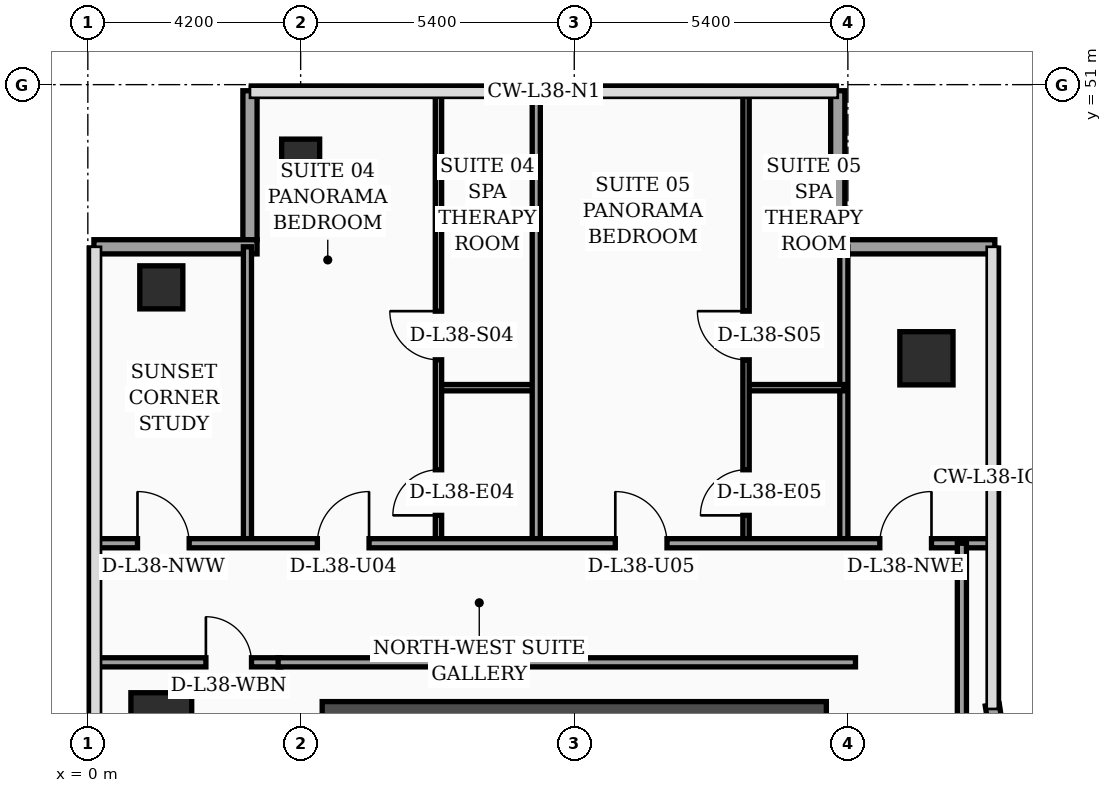
"""IFC4 building model, lengths in metres.
Left out: names, types, materials, properties, quantities, classifications, styles, units other than length and angle.
Written with IfcOpenShell. Run it as: python <this file> out.ifc"""

import sys

from ifc_helpers import new_model, si_unit, direction, frame, frame_2d, origin, origin_2d, place, context, subcontext, project, spatial, rectangle, hollow_rectangle, extrude, element, fill, save


model = new_model("IFC4")
c1 = context("Model", 3, precision=1e-05, world=origin(), true_north=direction((0.0, 1.0)))
c2 = subcontext(c1, "Body", "Model", "MODEL_VIEW")
j1 = project(units=[si_unit("LENGTHUNIT", "METRE"), si_unit("PLANEANGLEUNIT", "RADIAN")], contexts=[c1])
p1 = place(None, origin())
s1 = spatial("IfcSite", under=j1, at=p1, CompositionType="ELEMENT")
p2 = place(p1, origin())
s2 = spatial("IfcBuilding", under=s1, at=p2, CompositionType="ELEMENT")
p3 = place(p2, frame((0.0, 0.0, 156.1)))
s3 = spatial("IfcBuildingStorey", under=s2, at=p3, CompositionType="ELEMENT", Elevation=156.1)
p4 = place(p3, frame((4.625, 38.4, 0.0), z_axis=(0.0, 0.0, 1.0), x_axis=(1.0, 0.0, 0.0)))
e1 = element("IfcWall", 1, at=p4, inside=s3, PredefinedType="SHEAR", context=c2, shape_type="SweptSolid", body=[
    extrude(rectangle(XDim=9.95, YDim=0.85, at=frame_2d((4.975, 0.0))), origin(), (0.0, 0.0, 1.0), 3.56),
])
p5 = place(p3, frame((1.45, 38.4, 0.0), z_axis=(0.0, 0.0, 1.0), x_axis=(1.0, 0.0, 0.0)))
e2 = element("IfcColumn", 2, at=p5, inside=s3, PredefinedType="COLUMN", context=c2, shape_type="SweptSolid", body=[
    extrude(rectangle(XDim=1.2, YDim=1.2, at=origin_2d()), origin(), (0.0, 0.0, 1.0), 3.56),
])
p6 = place(p3, frame((1.45, 47.0, 0.0), z_axis=(0.0, 0.0, 1.0), x_axis=(1.0, 0.0, 0.0)))
e3 = element("IfcColumn", 3, at=p6, inside=s3, PredefinedType="COLUMN", context=c2, shape_type="SweptSolid", body=[
    extrude(hollow_rectangle(XDim=0.85, YDim=0.85, WallThickness=0.036, at=origin_2d()), origin(), (0.0, 0.0, 1.0), 3.56),
])
p7 = place(p3, frame((4.2, 49.55, 0.0), z_axis=(0.0, 0.0, 1.0), x_axis=(1.0, 0.0, 0.0)))
e4 = element("IfcColumn", 4, at=p7, inside=s3, PredefinedType="COLUMN", context=c2, shape_type="SweptSolid", body=[
    extrude(hollow_rectangle(XDim=0.75, YDim=0.75, WallThickness=0.032, at=origin_2d()), origin(), (0.0, 0.0, 1.0), 3.56),
])
p8 = place(p3, frame((16.55, 45.6, 0.0), z_axis=(0.0, 0.0, 1.0), x_axis=(1.0, 0.0, 0.0)))
e5 = element("IfcColumn", 5, at=p8, inside=s3, PredefinedType="COLUMN", context=c2, shape_type="SweptSolid", body=[
    extrude(rectangle(XDim=1.05, YDim=1.05, at=origin_2d()), origin(), (0.0, 0.0, 1.0), 3.56),
])
p9 = place(p3, frame((17.962, 38.03, 0.0), z_axis=(0.0, 0.0, 1.0), x_axis=(-0.15141125477, 0.988470855377, 0.0)))
e6 = element("IfcWall", 6, at=p9, inside=s3, PredefinedType="SOLIDWALL", context=c2, shape_type="SweptSolid", body=[
    extrude(rectangle(XDim=0.739, YDim=0.28, at=frame_2d((0.369, 0.0))), origin(), (0.0, 0.0, 1.0), 3.56),
])
p10 = place(p3, frame((17.9, 47.8, 0.0), z_axis=(0.0, 0.0, 1.0), x_axis=(-1.0, 0.0, 0.0)))
e7 = element("IfcWall", 7, at=p10, inside=s3, PredefinedType="SOLIDWALL", context=c2, shape_type="SweptSolid", body=[
    extrude(rectangle(XDim=3.24, YDim=0.28, at=frame_2d((1.62, 0.0))), origin(), (0.0, 0.0, 1.0), 3.56),
])
p11 = place(p3, frame((14.8, 47.94, 0.0), z_axis=(0.0, 0.0, 1.0), x_axis=(0.0, 1.0, 0.0)))
e8 = element("IfcWall", 8, at=p11, inside=s3, PredefinedType="SOLIDWALL", context=c2, shape_type="SweptSolid", body=[
    extrude(rectangle(XDim=2.94, YDim=0.28, at=frame_2d((1.47, 0.0))), origin(), (0.0, 0.0, 1.0), 3.56),
])
p12 = place(p3, frame((3.2, 50.88, 0.0), z_axis=(0.0, 0.0, 1.0), x_axis=(0.0, -1.0, 0.0)))
e9 = element("IfcWall", 9, at=p12, inside=s3, PredefinedType="SOLIDWALL", context=c2, shape_type="SweptSolid", body=[
    extrude(rectangle(XDim=2.94, YDim=0.28, at=frame_2d((1.47, 0.0))), origin(), (0.0, 0.0, 1.0), 3.04),
])
p13 = place(p3, frame((3.34, 47.8, 0.0), z_axis=(0.0, 0.0, 1.0), x_axis=(-1.0, 0.0, 0.0)))
e10 = element("IfcWall", 10, at=p13, inside=s3, PredefinedType="SOLIDWALL", context=c2, shape_type="SweptSolid", body=[
    extrude(rectangle(XDim=3.22, YDim=0.28, at=frame_2d((1.61, 0.0))), origin(), (0.0, 0.0, 1.0), 3.04),
])
p14 = place(p3, frame((0.08, 39.6, 0.0), z_axis=(0.0, 0.0, 1.0), x_axis=(1.0, 0.0, 0.0)))
e11 = element("IfcWall", 11, at=p14, inside=s3, PredefinedType="PARTITIONING", context=c2, shape_type="SweptSolid", body=[
    extrude(rectangle(XDim=3.725, YDim=0.18, at=frame_2d((1.862, 0.0))), origin(), (0.0, 0.0, 1.0), 2.94),
])
p15 = place(p14, frame((2.25, 0.0, 0.0)))
e12 = element("IfcOpeningElement", 12, at=p15, cuts=e11, PredefinedType="OPENING", context=c2, shape_type="SweptSolid", body=[
    extrude(rectangle(XDim=0.9, YDim=2.15, at=frame_2d((0.45, 1.075))), frame((0.0, 0.1, 0.0), z_axis=(0.0, -1.0, 0.0), x_axis=(1.0, 0.0, 0.0)), (0.0, 0.0, 1.0), 0.2),
])
p16 = place(p3, frame((3.15, 41.95, 0.0), z_axis=(0.0, 0.0, 1.0), x_axis=(0.0, 1.0, 0.0)))
e13 = element("IfcWall", 13, at=p16, inside=s3, PredefinedType="PARTITIONING", context=c2, shape_type="SweptSolid", body=[
    extrude(rectangle(XDim=5.85, YDim=0.16, at=frame_2d((2.925, 0.0))), origin(), (0.0, 0.0, 1.0), 3.14),
])
p17 = place(p3, frame((14.92, 41.95, 0.0), z_axis=(0.0, 0.0, 1.0), x_axis=(0.0, 1.0, 0.0)))
e14 = element("IfcWall", 14, at=p17, inside=s3, PredefinedType="PARTITIONING", context=c2, shape_type="SweptSolid", body=[
    extrude(rectangle(XDim=5.85, YDim=0.16, at=frame_2d((2.925, 0.0))), origin(), (0.0, 0.0, 1.0), 3.04),
])
p18 = place(p3, frame((6.92, 45.02, 0.0), z_axis=(0.0, 0.0, 1.0), x_axis=(1.0, 0.0, 0.0)))
e15 = element("IfcWall", 15, at=p18, inside=s3, PredefinedType="PARTITIONING", context=c2, shape_type="SweptSolid", body=[
    extrude(rectangle(XDim=1.93, YDim=0.125, at=frame_2d((0.965, 0.0))), origin(), (0.0, 0.0, 1.0), 3.56),
])
p19 = place(p3, frame((6.92, 41.95, 0.0), z_axis=(0.0, 0.0, 1.0), x_axis=(0.0, 1.0, 0.0)))
e16 = element("IfcWall", 16, at=p19, inside=s3, PredefinedType="PARTITIONING", context=c2, shape_type="SweptSolid", body=[
    extrude(rectangle(XDim=8.99, YDim=0.125, at=frame_2d((4.495, 0.0))), origin(), (0.0, 0.0, 1.0), 3.04),
])
p20 = place(p19, frame((0.55, 0.0, 0.0)))
e17 = element("IfcOpeningElement", 17, at=p20, cuts=e16, PredefinedType="OPENING", context=c2, shape_type="SweptSolid", body=[
    extrude(rectangle(XDim=0.9, YDim=2.15, at=frame_2d((0.45, 1.075))), frame((0.0, 0.073, 0.0), z_axis=(0.0, -1.0, 0.0), x_axis=(1.0, 0.0, 0.0)), (0.0, 0.0, 1.0), 0.145),
])
p21 = place(p19, frame((3.62, 0.0, 0.0)))
e18 = element("IfcOpeningElement", 18, at=p21, cuts=e16, PredefinedType="OPENING", context=c2, shape_type="SweptSolid", body=[
    extrude(rectangle(XDim=0.96, YDim=2.2, at=frame_2d((0.48, 1.1))), frame((0.0, 0.073, 0.0), z_axis=(0.0, -1.0, 0.0), x_axis=(1.0, 0.0, 0.0)), (0.0, 0.0, 1.0), 0.145),
])
p22 = place(p3, frame((12.99, 45.02, 0.0), z_axis=(0.0, 0.0, 1.0), x_axis=(1.0, 0.0, 0.0)))
e19 = element("IfcWall", 19, at=p22, inside=s3, PredefinedType="PARTITIONING", context=c2, shape_type="SweptSolid", body=[
    extrude(rectangle(XDim=1.93, YDim=0.125, at=frame_2d((0.965, 0.0))), origin(), (0.0, 0.0, 1.0), 3.56),
])
p23 = place(p3, frame((12.99, 41.95, 0.0), z_axis=(0.0, 0.0, 1.0), x_axis=(0.0, 1.0, 0.0)))
e20 = element("IfcWall", 20, at=p23, inside=s3, PredefinedType="PARTITIONING", context=c2, shape_type="SweptSolid", body=[
    extrude(rectangle(XDim=8.99, YDim=0.125, at=frame_2d((4.495, 0.0))), origin(), (0.0, 0.0, 1.0), 3.04),
])
p24 = place(p23, frame((0.55, 0.0, 0.0)))
e21 = element("IfcOpeningElement", 21, at=p24, cuts=e20, PredefinedType="OPENING", context=c2, shape_type="SweptSolid", body=[
    extrude(rectangle(XDim=0.9, YDim=2.15, at=frame_2d((0.45, 1.075))), frame((0.0, 0.073, 0.0), z_axis=(0.0, -1.0, 0.0), x_axis=(1.0, 0.0, 0.0)), (0.0, 0.0, 1.0), 0.145),
])
p25 = place(p23, frame((3.62, 0.0, 0.0)))
e22 = element("IfcOpeningElement", 22, at=p25, cuts=e20, PredefinedType="OPENING", context=c2, shape_type="SweptSolid", body=[
    extrude(rectangle(XDim=0.96, YDim=2.2, at=frame_2d((0.48, 1.1))), frame((0.0, 0.073, 0.0), z_axis=(0.0, -1.0, 0.0), x_axis=(1.0, 0.0, 0.0)), (0.0, 0.0, 1.0), 0.145),
])
p26 = place(p3, frame((8.85, 41.95, 0.0), z_axis=(0.0, 0.0, 1.0), x_axis=(0.0, 1.0, 0.0)))
e23 = element("IfcWall", 23, at=p26, inside=s3, PredefinedType="PARTITIONING", context=c2, shape_type="SweptSolid", body=[
    extrude(rectangle(XDim=8.99, YDim=0.16, at=frame_2d((4.495, 0.0))), origin(), (0.0, 0.0, 1.0), 3.04),
])
p27 = place(p3, frame((0.08, 41.95, 0.0), z_axis=(0.0, 0.0, 1.0), x_axis=(1.0, 0.0, 0.0)))
e24 = element("IfcWall", 24, at=p27, inside=s3, PredefinedType="PARTITIONING", context=c2, shape_type="SweptSolid", body=[
    extrude(rectangle(XDim=17.77, YDim=0.18, at=frame_2d((8.885, 0.0))), origin(), (0.0, 0.0, 1.0), 2.94),
])
p28 = place(p27, frame((0.9, 0.0, 0.0)))
e25 = element("IfcOpeningElement", 25, at=p28, cuts=e24, PredefinedType="OPENING", context=c2, shape_type="SweptSolid", body=[
    extrude(rectangle(XDim=1.02, YDim=2.2, at=frame_2d((0.51, 1.1))), frame((0.0, 0.1, 0.0), z_axis=(0.0, -1.0, 0.0), x_axis=(1.0, 0.0, 0.0)), (0.0, 0.0, 1.0), 0.2),
])
p29 = place(p27, frame((4.45, 0.0, 0.0)))
e26 = element("IfcOpeningElement", 26, at=p29, cuts=e24, PredefinedType="OPENING", context=c2, shape_type="SweptSolid", body=[
    extrude(rectangle(XDim=1.02, YDim=2.2, at=frame_2d((0.51, 1.1))), frame((0.0, 0.1, 0.0), z_axis=(0.0, -1.0, 0.0), x_axis=(1.0, 0.0, 0.0)), (0.0, 0.0, 1.0), 0.2),
])
p30 = place(p27, frame((10.33, 0.0, 0.0)))
e27 = element("IfcOpeningElement", 27, at=p30, cuts=e24, PredefinedType="OPENING", context=c2, shape_type="SweptSolid", body=[
    extrude(rectangle(XDim=1.02, YDim=2.2, at=frame_2d((0.51, 1.1))), frame((0.0, 0.1, 0.0), z_axis=(0.0, -1.0, 0.0), x_axis=(1.0, 0.0, 0.0)), (0.0, 0.0, 1.0), 0.2),
])
p31 = place(p27, frame((15.55, 0.0, 0.0)))
e28 = element("IfcOpeningElement", 28, at=p31, cuts=e24, PredefinedType="OPENING", context=c2, shape_type="SweptSolid", body=[
    extrude(rectangle(XDim=1.02, YDim=2.2, at=frame_2d((0.51, 1.1))), frame((0.0, 0.1, 0.0), z_axis=(0.0, -1.0, 0.0), x_axis=(1.0, 0.0, 0.0)), (0.0, 0.0, 1.0), 0.2),
])
p32 = place(p3, frame((17.25, 24.3, 0.0), z_axis=(0.0, 0.0, 1.0), x_axis=(0.0, 1.0, 0.0)))
e29 = element("IfcWall", 29, at=p32, inside=s3, PredefinedType="PARTITIONING", context=c2, shape_type="SweptSolid", body=[
    extrude(rectangle(XDim=17.65, YDim=0.18, at=frame_2d((8.825, 0.0))), origin(), (0.0, 0.0, 1.0), 2.94),
])
p33 = place(p3, frame((3.755, 39.6, 0.0), z_axis=(0.0, 0.0, 1.0), x_axis=(1.0, 0.0, 0.0)))
e30 = element("IfcWall", 30, at=p33, inside=s3, PredefinedType="PARTITIONING", context=c2, shape_type="SweptSolid", body=[
    extrude(rectangle(XDim=11.395, YDim=0.18, at=frame_2d((5.698, 0.0))), origin(), (0.0, 0.0, 1.0), 2.94),
])
p34 = place(p15, origin())
e31 = element("IfcDoor", 31, at=p34, inside=s3, OperationType="SINGLE_SWING_LEFT", PredefinedType="DOOR", context=c2, shape_type="SweptSolid", body=[
    extrude(rectangle(XDim=0.9, YDim=2.15, at=frame_2d((0.45, 1.075))), frame((0.0, 0.025, 0.0), z_axis=(0.0, -1.0, 0.0), x_axis=(1.0, 0.0, 0.0)), (0.0, 0.0, 1.0), 0.05),
])
fill(e12, e31)
p35 = place(p20, origin())
e32 = element("IfcDoor", 32, at=p35, inside=s3, OperationType="SINGLE_SWING_LEFT", PredefinedType="DOOR", context=c2, shape_type="SweptSolid", body=[
    extrude(rectangle(XDim=0.9, YDim=2.15, at=frame_2d((0.45, 1.075))), frame((0.0, 0.025, 0.0), z_axis=(0.0, -1.0, 0.0), x_axis=(1.0, 0.0, 0.0)), (0.0, 0.0, 1.0), 0.05),
])
fill(e17, e32)
p36 = place(p21, origin())
e33 = element("IfcDoor", 33, at=p36, inside=s3, OperationType="SINGLE_SWING_RIGHT", PredefinedType="DOOR", context=c2, shape_type="SweptSolid", body=[
    extrude(rectangle(XDim=0.96, YDim=2.2, at=frame_2d((0.48, 1.1))), frame((0.0, 0.025, 0.0), z_axis=(0.0, -1.0, 0.0), x_axis=(1.0, 0.0, 0.0)), (0.0, 0.0, 1.0), 0.05),
])
fill(e18, e33)
p37 = place(p24, origin())
e34 = element("IfcDoor", 34, at=p37, inside=s3, OperationType="SINGLE_SWING_LEFT", PredefinedType="DOOR", context=c2, shape_type="SweptSolid", body=[
    extrude(rectangle(XDim=0.9, YDim=2.15, at=frame_2d((0.45, 1.075))), frame((0.0, 0.025, 0.0), z_axis=(0.0, -1.0, 0.0), x_axis=(1.0, 0.0, 0.0)), (0.0, 0.0, 1.0), 0.05),
])
fill(e21, e34)
p38 = place(p25, origin())
e35 = element("IfcDoor", 35, at=p38, inside=s3, OperationType="SINGLE_SWING_RIGHT", PredefinedType="DOOR", context=c2, shape_type="SweptSolid", body=[
    extrude(rectangle(XDim=0.96, YDim=2.2, at=frame_2d((0.48, 1.1))), frame((0.0, 0.025, 0.0), z_axis=(0.0, -1.0, 0.0), x_axis=(1.0, 0.0, 0.0)), (0.0, 0.0, 1.0), 0.05),
])
fill(e22, e35)
p39 = place(p28, origin())
e36 = element("IfcDoor", 36, at=p39, inside=s3, OperationType="SINGLE_SWING_LEFT", PredefinedType="DOOR", context=c2, shape_type="SweptSolid", body=[
    extrude(rectangle(XDim=1.02, YDim=2.2, at=frame_2d((0.51, 1.1))), frame((0.0, 0.025, 0.0), z_axis=(0.0, -1.0, 0.0), x_axis=(1.0, 0.0, 0.0)), (0.0, 0.0, 1.0), 0.05),
])
fill(e25, e36)
p40 = place(p29, origin())
e37 = element("IfcDoor", 37, at=p40, inside=s3, OperationType="SINGLE_SWING_RIGHT", PredefinedType="DOOR", context=c2, shape_type="SweptSolid", body=[
    extrude(rectangle(XDim=1.02, YDim=2.2, at=frame_2d((0.51, 1.1))), frame((0.0, 0.025, 0.0), z_axis=(0.0, -1.0, 0.0), x_axis=(1.0, 0.0, 0.0)), (0.0, 0.0, 1.0), 0.05),
])
fill(e26, e37)
p41 = place(p30, origin())
e38 = element("IfcDoor", 38, at=p41, inside=s3, OperationType="SINGLE_SWING_LEFT", PredefinedType="DOOR", context=c2, shape_type="SweptSolid", body=[
    extrude(rectangle(XDim=1.02, YDim=2.2, at=frame_2d((0.51, 1.1))), frame((0.0, 0.025, 0.0), z_axis=(0.0, -1.0, 0.0), x_axis=(1.0, 0.0, 0.0)), (0.0, 0.0, 1.0), 0.05),
])
fill(e27, e38)
p42 = place(p31, origin())
e39 = element("IfcDoor", 39, at=p42, inside=s3, OperationType="SINGLE_SWING_RIGHT", PredefinedType="DOOR", context=c2, shape_type="SweptSolid", body=[
    extrude(rectangle(XDim=1.02, YDim=2.2, at=frame_2d((0.51, 1.1))), frame((0.0, 0.025, 0.0), z_axis=(0.0, -1.0, 0.0), x_axis=(1.0, 0.0, 0.0)), (0.0, 0.0, 1.0), 0.05),
])
fill(e28, e39)
save(model, sys.argv[1])
